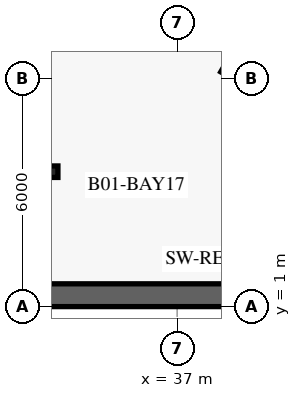
"""IFC4 building model, lengths in metres.
Left out: names, types, materials, properties, quantities, classifications, styles, units other than length and angle.
Written with IfcOpenShell. Run it as: python <this file> out.ifc"""

import sys

from ifc_helpers import new_model, si_unit, direction, frame, frame_2d, origin, origin_2d, place, context, subcontext, project, spatial, rectangle, i_section, extrude, element, save


model = new_model("IFC4")
c1 = context("Model", 3, precision=1e-05, world=origin(), true_north=direction((0.0, 1.0)))
c2 = subcontext(c1, "Body", "Model", "MODEL_VIEW")
j1 = project(units=[si_unit("LENGTHUNIT", "METRE"), si_unit("PLANEANGLEUNIT", "RADIAN")], contexts=[c1])
p1 = place(None, origin())
s1 = spatial("IfcSite", under=j1, at=p1, CompositionType="ELEMENT")
p2 = place(p1, origin())
s2 = spatial("IfcBuilding", under=s1, at=p2, CompositionType="ELEMENT")
p3 = place(p2, frame((0.0, 0.0, -4.2)))
s3 = spatial("IfcBuildingStorey", under=s2, at=p3, CompositionType="ELEMENT", Elevation=-4.2)
p4 = place(p3, frame((1.0, 1.3, 0.0), z_axis=(0.0, 0.0, 1.0), x_axis=(1.0, 0.0, 0.0)))
e1 = element("IfcWall", 1, at=p4, inside=s3, PredefinedType="USERDEFINED", context=c2, shape_type="SweptSolid", body=[
    extrude(rectangle(XDim=74.0, YDim=0.6, at=frame_2d((37.0, 0.0))), origin(), (0.0, 0.0, 1.0), 3.88),
])
p5 = place(p3, frame((38.531, 7.536, 0.0), z_axis=(0.0, 0.0, 1.0), x_axis=(0.5, 0.866025403784, 0.0)))
e2 = element("IfcColumn", 2, at=p5, inside=s3, PredefinedType="COLUMN", context=c2, shape_type="SweptSolid", body=[
    extrude(i_section(OverallWidth=0.302, OverallDepth=1.008, WebThickness=0.021, FlangeThickness=0.04, at=origin_2d()), origin(), (0.0, 0.0, 1.0), 4.2),
])
save(model, sys.argv[1])
